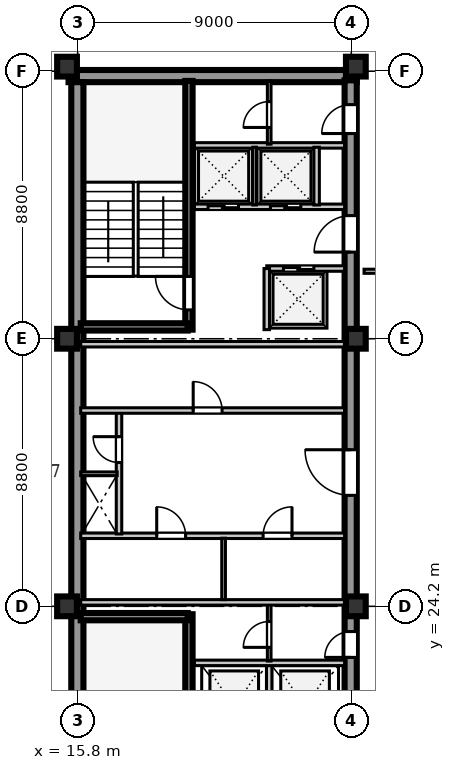
"""IFC4 building model, lengths in metres.
Left out: names, types, materials, properties, quantities, classifications, styles, units other than length and angle.
Written with IfcOpenShell. Run it as: python <this file> out.ifc"""

import sys

from ifc_helpers import new_model, si_unit, direction, frame, frame_2d, origin, origin_2d, place, context, subcontext, project, spatial, rectangle, extrude, element, fill, save


model = new_model("IFC4")
c1 = context("Model", 3, precision=1e-05, world=origin(), true_north=direction((0.0, 1.0)))
c2 = subcontext(c1, "Body", "Model", "MODEL_VIEW")
j1 = project(units=[si_unit("LENGTHUNIT", "METRE"), si_unit("PLANEANGLEUNIT", "RADIAN")], contexts=[c1])
p1 = place(None, origin())
s1 = spatial("IfcSite", under=j1, at=p1, CompositionType="ELEMENT")
p2 = place(p1, origin())
s2 = spatial("IfcBuilding", under=s1, at=p2, CompositionType="ELEMENT")
p3 = place(p2, frame((0.0, 0.0, 296.0)))
s3 = spatial("IfcBuildingStorey", under=s2, at=p3, CompositionType="ELEMENT", Elevation=296.0)
p4 = place(p3, frame((15.5, 41.64, 0.0), z_axis=(0.0, 0.0, 1.0), x_axis=(1.0, 0.0, 0.0)))
e1 = element("IfcWall", 1, at=p4, inside=s3, PredefinedType="SHEAR", context=c2, shape_type="SweptSolid", body=[
    extrude(rectangle(XDim=9.48, YDim=0.4, at=frame_2d((4.74, 0.0))), origin(), (0.0, 0.0, 1.0), 3.66),
])
p5 = place(p3, frame((15.79, 15.81, 0.0), z_axis=(0.0, 0.0, 1.0), x_axis=(0.0, 1.0, 0.0)))
e2 = element("IfcWall", 2, at=p5, inside=s3, PredefinedType="SHEAR", context=c2, shape_type="SweptSolid", body=[
    extrude(rectangle(XDim=25.63, YDim=0.4, at=frame_2d((12.815, 0.0))), origin(), (0.0, 0.0, 1.0), 3.66),
])
p6 = place(p3, frame((24.78, 15.74, 0.0), z_axis=(0.0, 0.0, 1.0), x_axis=(0.0, 1.0, 0.0)))
e3 = element("IfcWall", 3, at=p6, inside=s3, PredefinedType="SHEAR", context=c2, shape_type="SweptSolid", body=[
    extrude(rectangle(XDim=25.76, YDim=0.4, at=frame_2d((12.88, 0.0))), origin(), (0.0, 0.0, 1.0), 3.66),
])
p7 = place(p6, frame((1.61, 0.0, 0.0)))
e4 = element("IfcOpeningElement", 4, at=p7, cuts=e3, PredefinedType="OPENING", context=c2, shape_type="SweptSolid", body=[
    extrude(rectangle(XDim=1.2, YDim=2.1, at=frame_2d((0.6, 1.05))), frame((0.0, 0.21, 0.0), z_axis=(0.0, -1.0, 0.0), x_axis=(1.0, 0.0, 0.0)), (0.0, 0.0, 1.0), 0.42),
])
p8 = place(p6, frame((6.78, 0.0, 0.0)))
e5 = element("IfcOpeningElement", 5, at=p8, cuts=e3, PredefinedType="OPENING", context=c2, shape_type="SweptSolid", body=[
    extrude(rectangle(XDim=0.85, YDim=2.06, at=frame_2d((0.425, 1.03))), frame((0.0, 0.21, 0.0), z_axis=(0.0, -1.0, 0.0), x_axis=(1.0, 0.0, 0.0)), (0.0, 0.0, 1.0), 0.42),
])
p9 = place(p6, frame((12.11, 0.0, 0.0)))
e6 = element("IfcOpeningElement", 6, at=p9, cuts=e3, PredefinedType="OPENING", context=c2, shape_type="SweptSolid", body=[
    extrude(rectangle(XDim=1.5, YDim=2.12, at=frame_2d((0.75, 1.06))), frame((0.0, 0.21, 0.0), z_axis=(0.0, -1.0, 0.0), x_axis=(1.0, 0.0, 0.0)), (0.0, 0.0, 1.0), 0.42),
])
p10 = place(p6, frame((20.11, 0.0, 0.0)))
e7 = element("IfcOpeningElement", 7, at=p10, cuts=e3, PredefinedType="OPENING", context=c2, shape_type="SweptSolid", body=[
    extrude(rectangle(XDim=1.2, YDim=2.12, at=frame_2d((0.6, 1.06))), frame((0.0, 0.21, 0.0), z_axis=(0.0, -1.0, 0.0), x_axis=(1.0, 0.0, 0.0)), (0.0, 0.0, 1.0), 0.42),
])
p11 = place(p6, frame((24.01, 0.0, 0.0)))
e8 = element("IfcOpeningElement", 8, at=p11, cuts=e3, PredefinedType="OPENING", context=c2, shape_type="SweptSolid", body=[
    extrude(rectangle(XDim=0.95, YDim=2.1, at=frame_2d((0.475, 1.05))), frame((0.0, 0.21, 0.0), z_axis=(0.0, -1.0, 0.0), x_axis=(1.0, 0.0, 0.0)), (0.0, 0.0, 1.0), 0.42),
])
for number, where, z_axis, x_axis in (
    (9, (15.45, 24.2, 0.0), (0.0, 0.0, 1.0), (1.0, 0.0, 0.0)),
    (10, (15.45, 33.0, 0.0), (0.0, 0.0, 1.0), (1.0, 0.0, 0.0)),
    (11, (15.45, 41.95, 0.0), (0.0, 0.0, 1.0), (1.0, 0.0, 0.0)),
    (12, (24.95, 24.2, 0.0), (0.0, 0.0, 1.0), (1.0, 0.0, 0.0)),
    (13, (24.95, 33.0, 0.0), (0.0, 0.0, 1.0), (1.0, 0.0, 0.0)),
    (14, (24.95, 41.95, 0.0), (0.0, 0.0, 1.0), (1.0, 0.0, 0.0)),
):
    element("IfcColumn", number, at=place(p3, frame(where, z_axis=z_axis, x_axis=x_axis)), inside=s3, PredefinedType="COLUMN", context=c2, shape_type="SweptSolid", body=[
        extrude(rectangle(XDim=0.65, YDim=0.65, at=origin_2d()), origin(), (0.0, 0.0, 1.0), 3.66),
    ])
p12 = place(p3, frame((19.46, 15.74, 0.0), z_axis=(0.0, 0.0, 1.0), x_axis=(0.0, 1.0, 0.0)))
e15 = element("IfcWall", 15, at=p12, inside=s3, PredefinedType="SHEAR", context=c2, shape_type="SweptSolid", body=[
    extrude(rectangle(XDim=8.2, YDim=0.24, at=frame_2d((4.1, 0.0))), origin(), (0.0, 0.0, 1.0), 3.9),
])
p13 = place(p12, frame((0.45, 0.0, 0.0)))
e16 = element("IfcOpeningElement", 16, at=p13, cuts=e15, PredefinedType="OPENING", context=c2, shape_type="SweptSolid", body=[
    extrude(rectangle(XDim=1.1, YDim=2.1, at=frame_2d((0.55, 1.05))), frame((0.0, 0.13, 0.0), z_axis=(0.0, -1.0, 0.0), x_axis=(1.0, 0.0, 0.0)), (0.0, 0.0, 1.0), 0.26),
])
p14 = place(p3, frame((15.9, 23.86, 0.0), z_axis=(0.0, 0.0, 1.0), x_axis=(1.0, 0.0, 0.0)))
e17 = element("IfcWall", 17, at=p14, inside=s3, PredefinedType="SHEAR", context=c2, shape_type="SweptSolid", body=[
    extrude(rectangle(XDim=3.52, YDim=0.24, at=frame_2d((1.76, 0.0))), origin(), (0.0, 0.0, 1.0), 3.9),
])
p15 = place(p3, frame((22.1, 19.51, 0.0), z_axis=(0.0, 0.0, 1.0), x_axis=(0.0, 1.0, 0.0)))
e18 = element("IfcWall", 18, at=p15, inside=s3, PredefinedType="SOLIDWALL", context=c2, shape_type="SweptSolid", body=[
    extrude(rectangle(XDim=2.74, YDim=0.18, at=frame_2d((1.37, 0.0))), origin(), (0.0, 0.0, 1.0), 3.66),
])
p16 = place(p3, frame((19.64, 22.34, 0.0), z_axis=(0.0, 0.0, 1.0), x_axis=(1.0, 0.0, 0.0)))
e19 = element("IfcWall", 19, at=p16, inside=s3, PredefinedType="SOLIDWALL", context=c2, shape_type="SweptSolid", body=[
    extrude(rectangle(XDim=4.94, YDim=0.18, at=frame_2d((2.47, 0.0))), origin(), (0.0, 0.0, 1.0), 3.66),
])
p17 = place(p3, frame((22.1, 22.4, 0.0), z_axis=(0.0, 0.0, 1.0), x_axis=(0.0, 1.0, 0.0)))
e20 = element("IfcWall", 20, at=p17, inside=s3, PredefinedType="PARTITIONING", context=c2, shape_type="SweptSolid", body=[
    extrude(rectangle(XDim=1.88, YDim=0.12, at=frame_2d((0.94, 0.0))), origin(), (0.0, 0.0, 1.0), 3.66),
])
p18 = place(p17, frame((0.45, 0.0, 0.0)))
e21 = element("IfcOpeningElement", 21, at=p18, cuts=e20, PredefinedType="OPENING", context=c2, shape_type="SweptSolid", body=[
    extrude(rectangle(XDim=0.85, YDim=2.06, at=frame_2d((0.425, 1.03))), frame((0.0, 0.07, 0.0), z_axis=(0.0, -1.0, 0.0), x_axis=(1.0, 0.0, 0.0)), (0.0, 0.0, 1.0), 0.14),
])
p19 = place(p3, frame((15.9, 26.52, 0.0), z_axis=(0.0, 0.0, 1.0), x_axis=(1.0, 0.0, 0.0)))
e22 = element("IfcWall", 22, at=p19, inside=s3, PredefinedType="SOLIDWALL", context=c2, shape_type="SweptSolid", body=[
    extrude(rectangle(XDim=8.68, YDim=0.18, at=frame_2d((4.34, 0.0))), origin(), (0.0, 0.0, 1.0), 3.66),
])
p20 = place(p19, frame((2.5, 0.0, 0.0)))
e23 = element("IfcOpeningElement", 23, at=p20, cuts=e22, PredefinedType="OPENING", context=c2, shape_type="SweptSolid", body=[
    extrude(rectangle(XDim=0.95, YDim=2.1, at=frame_2d((0.475, 1.05))), frame((0.0, 0.1, 0.0), z_axis=(0.0, -1.0, 0.0), x_axis=(1.0, 0.0, 0.0)), (0.0, 0.0, 1.0), 0.2),
])
p21 = place(p19, frame((6.0, 0.0, 0.0)))
e24 = element("IfcOpeningElement", 24, at=p21, cuts=e22, PredefinedType="OPENING", context=c2, shape_type="SweptSolid", body=[
    extrude(rectangle(XDim=0.95, YDim=2.1, at=frame_2d((0.475, 1.05))), frame((0.0, 0.1, 0.0), z_axis=(0.0, -1.0, 0.0), x_axis=(1.0, 0.0, 0.0)), (0.0, 0.0, 1.0), 0.2),
])
p22 = place(p3, frame((15.9, 24.33, 0.0), z_axis=(0.0, 0.0, 1.0), x_axis=(1.0, 0.0, 0.0)))
e25 = element("IfcWall", 25, at=p22, inside=s3, PredefinedType="SOLIDWALL", context=c2, shape_type="SweptSolid", body=[
    extrude(rectangle(XDim=8.68, YDim=0.18, at=frame_2d((4.34, 0.0))), origin(), (0.0, 0.0, 1.0), 3.06),
])
p23 = place(p3, frame((20.6, 24.42, 0.0), z_axis=(0.0, 0.0, 1.0), x_axis=(0.0, 1.0, 0.0)))
e26 = element("IfcWall", 26, at=p23, inside=s3, PredefinedType="PARTITIONING", context=c2, shape_type="SweptSolid", body=[
    extrude(rectangle(XDim=2.02, YDim=0.12, at=frame_2d((1.01, 0.0))), origin(), (0.0, 0.0, 1.0), 3.66),
])
p24 = place(p3, frame((17.16, 26.58, 0.0), z_axis=(0.0, 0.0, 1.0), x_axis=(0.0, 1.0, 0.0)))
e27 = element("IfcWall", 27, at=p24, inside=s3, PredefinedType="SOLIDWALL", context=c2, shape_type="SweptSolid", body=[
    extrude(rectangle(XDim=4.02, YDim=0.18, at=frame_2d((2.01, 0.0))), origin(), (0.0, 0.0, 1.0), 3.66),
])
p25 = place(p24, frame((2.35, 0.0, 0.0)))
e28 = element("IfcOpeningElement", 28, at=p25, cuts=e27, PredefinedType="OPENING", context=c2, shape_type="SweptSolid", body=[
    extrude(rectangle(XDim=0.85, YDim=2.06, at=frame_2d((0.425, 1.03))), frame((0.0, 0.1, 0.0), z_axis=(0.0, -1.0, 0.0), x_axis=(1.0, 0.0, 0.0)), (0.0, 0.0, 1.0), 0.2),
])
p26 = place(p3, frame((15.9, 28.56, 0.0), z_axis=(0.0, 0.0, 1.0), x_axis=(1.0, 0.0, 0.0)))
e29 = element("IfcWall", 29, at=p26, inside=s3, PredefinedType="PARTITIONING", context=c2, shape_type="SweptSolid", body=[
    extrude(rectangle(XDim=1.2, YDim=0.12, at=frame_2d((0.6, 0.0))), origin(), (0.0, 0.0, 1.0), 3.66),
])
p27 = place(p3, frame((15.9, 30.64, 0.0), z_axis=(0.0, 0.0, 1.0), x_axis=(1.0, 0.0, 0.0)))
e30 = element("IfcWall", 30, at=p27, inside=s3, PredefinedType="SOLIDWALL", context=c2, shape_type="SweptSolid", body=[
    extrude(rectangle(XDim=8.68, YDim=0.18, at=frame_2d((4.34, 0.0))), origin(), (0.0, 0.0, 1.0), 3.66),
])
p28 = place(p27, frame((3.7, 0.0, 0.0)))
e31 = element("IfcOpeningElement", 31, at=p28, cuts=e30, PredefinedType="OPENING", context=c2, shape_type="SweptSolid", body=[
    extrude(rectangle(XDim=0.95, YDim=2.1, at=frame_2d((0.475, 1.05))), frame((0.0, 0.1, 0.0), z_axis=(0.0, -1.0, 0.0), x_axis=(1.0, 0.0, 0.0)), (0.0, 0.0, 1.0), 0.2),
])
p29 = place(p3, frame((15.9, 32.82, 0.0), z_axis=(0.0, 0.0, 1.0), x_axis=(1.0, 0.0, 0.0)))
e32 = element("IfcWall", 32, at=p29, inside=s3, PredefinedType="SOLIDWALL", context=c2, shape_type="SweptSolid", body=[
    extrude(rectangle(XDim=8.68, YDim=0.18, at=frame_2d((4.34, 0.0))), origin(), (0.0, 0.0, 1.0), 3.06),
])
p30 = place(p3, frame((19.46, 33.3, 0.0), z_axis=(0.0, 0.0, 1.0), x_axis=(0.0, 1.0, 0.0)))
e33 = element("IfcWall", 33, at=p30, inside=s3, PredefinedType="SHEAR", context=c2, shape_type="SweptSolid", body=[
    extrude(rectangle(XDim=8.18, YDim=0.24, at=frame_2d((4.09, 0.0))), origin(), (0.0, 0.0, 1.0), 3.9),
])
p31 = place(p30, frame((0.65, 0.0, 0.0)))
e34 = element("IfcOpeningElement", 34, at=p31, cuts=e33, PredefinedType="OPENING", context=c2, shape_type="SweptSolid", body=[
    extrude(rectangle(XDim=1.1, YDim=2.1, at=frame_2d((0.55, 1.05))), frame((0.0, 0.13, 0.0), z_axis=(0.0, -1.0, 0.0), x_axis=(1.0, 0.0, 0.0)), (0.0, 0.0, 1.0), 0.26),
])
p32 = place(p3, frame((15.9, 33.39, 0.0), z_axis=(0.0, 0.0, 1.0), x_axis=(1.0, 0.0, 0.0)))
e35 = element("IfcWall", 35, at=p32, inside=s3, PredefinedType="SHEAR", context=c2, shape_type="SweptSolid", body=[
    extrude(rectangle(XDim=3.52, YDim=0.24, at=frame_2d((1.76, 0.0))), origin(), (0.0, 0.0, 1.0), 3.9),
])
p33 = place(p3, frame((22.02, 35.31, 0.0), z_axis=(0.0, 0.0, 1.0), x_axis=(1.0, 0.0, 0.0)))
e36 = element("IfcWall", 36, at=p33, inside=s3, PredefinedType="SOLIDWALL", context=c2, shape_type="SweptSolid", body=[
    extrude(rectangle(XDim=2.56, YDim=0.18, at=frame_2d((1.28, 0.0))), origin(), (0.0, 0.0, 1.0), 3.66),
])
p34 = place(p33, frame((0.55, 0.0, 0.0)))
e37 = element("IfcOpeningElement", 37, at=p34, cuts=e36, PredefinedType="OPENING", context=c2, shape_type="SweptSolid", body=[
    extrude(rectangle(XDim=1.0, YDim=2.1, at=frame_2d((0.5, 1.05))), frame((0.0, 0.1, 0.0), z_axis=(0.0, -1.0, 0.0), x_axis=(1.0, 0.0, 0.0)), (0.0, 0.0, 1.0), 0.2),
])
p35 = place(p3, frame((22.02, 33.3, 0.0), z_axis=(0.0, 0.0, 1.0), x_axis=(0.0, 1.0, 0.0)))
e38 = element("IfcWall", 38, at=p35, inside=s3, PredefinedType="SOLIDWALL", context=c2, shape_type="SweptSolid", body=[
    extrude(rectangle(XDim=2.01, YDim=0.18, at=frame_2d((1.005, 0.0))), origin(), (0.0, 0.0, 1.0), 3.66),
])
p36 = place(p3, frame((19.64, 37.34, 0.0), z_axis=(0.0, 0.0, 1.0), x_axis=(1.0, 0.0, 0.0)))
e39 = element("IfcWall", 39, at=p36, inside=s3, PredefinedType="SOLIDWALL", context=c2, shape_type="SweptSolid", body=[
    extrude(rectangle(XDim=4.94, YDim=0.18, at=frame_2d((2.47, 0.0))), origin(), (0.0, 0.0, 1.0), 3.66),
])
p37 = place(p36, frame((0.45, 0.0, 0.0)))
e40 = element("IfcOpeningElement", 40, at=p37, cuts=e39, PredefinedType="OPENING", context=c2, shape_type="SweptSolid", body=[
    extrude(rectangle(XDim=1.0, YDim=2.1, at=frame_2d((0.5, 1.05))), frame((0.0, 0.1, 0.0), z_axis=(0.0, -1.0, 0.0), x_axis=(1.0, 0.0, 0.0)), (0.0, 0.0, 1.0), 0.2),
])
p38 = place(p36, frame((2.5, 0.0, 0.0)))
e41 = element("IfcOpeningElement", 41, at=p38, cuts=e39, PredefinedType="OPENING", context=c2, shape_type="SweptSolid", body=[
    extrude(rectangle(XDim=1.0, YDim=2.1, at=frame_2d((0.5, 1.05))), frame((0.0, 0.1, 0.0), z_axis=(0.0, -1.0, 0.0), x_axis=(1.0, 0.0, 0.0)), (0.0, 0.0, 1.0), 0.2),
])
p39 = place(p3, frame((19.64, 39.36, 0.0), z_axis=(0.0, 0.0, 1.0), x_axis=(1.0, 0.0, 0.0)))
e42 = element("IfcWall", 42, at=p39, inside=s3, PredefinedType="SOLIDWALL", context=c2, shape_type="SweptSolid", body=[
    extrude(rectangle(XDim=4.94, YDim=0.18, at=frame_2d((2.47, 0.0))), origin(), (0.0, 0.0, 1.0), 3.66),
])
p40 = place(p3, frame((21.62, 37.4, 0.0), z_axis=(0.0, 0.0, 1.0), x_axis=(0.0, 1.0, 0.0)))
e43 = element("IfcWall", 43, at=p40, inside=s3, PredefinedType="PARTITIONING", context=c2, shape_type="SweptSolid", body=[
    extrude(rectangle(XDim=1.9, YDim=0.12, at=frame_2d((0.95, 0.0))), origin(), (0.0, 0.0, 1.0), 3.66),
])
p41 = place(p3, frame((23.66, 37.4, 0.0), z_axis=(0.0, 0.0, 1.0), x_axis=(0.0, 1.0, 0.0)))
e44 = element("IfcWall", 44, at=p41, inside=s3, PredefinedType="SOLIDWALL", context=c2, shape_type="SweptSolid", body=[
    extrude(rectangle(XDim=1.9, YDim=0.18, at=frame_2d((0.95, 0.0))), origin(), (0.0, 0.0, 1.0), 3.66),
])
p42 = place(p3, frame((22.1, 39.4, 0.0), z_axis=(0.0, 0.0, 1.0), x_axis=(0.0, 1.0, 0.0)))
e45 = element("IfcWall", 45, at=p42, inside=s3, PredefinedType="PARTITIONING", context=c2, shape_type="SweptSolid", body=[
    extrude(rectangle(XDim=2.08, YDim=0.12, at=frame_2d((1.04, 0.0))), origin(), (0.0, 0.0, 1.0), 3.66),
])
p43 = place(p42, frame((0.55, 0.0, 0.0)))
e46 = element("IfcOpeningElement", 46, at=p43, cuts=e45, PredefinedType="OPENING", context=c2, shape_type="SweptSolid", body=[
    extrude(rectangle(XDim=0.85, YDim=2.06, at=frame_2d((0.425, 1.03))), frame((0.0, 0.07, 0.0), z_axis=(0.0, -1.0, 0.0), x_axis=(1.0, 0.0, 0.0)), (0.0, 0.0, 1.0), 0.14),
])
p44 = place(p3, frame((25.22, 35.22, 0.0), z_axis=(0.0, 0.0, 1.0), x_axis=(1.0, 0.0, 0.0)))
e47 = element("IfcWall", 47, at=p44, inside=s3, PredefinedType="PARTITIONING", context=c2, shape_type="SweptSolid", body=[
    extrude(rectangle(XDim=9.5, YDim=0.135, at=frame_2d((4.75, 0.0))), origin(), (0.0, 0.0, 1.0), 3.66),
])
p45 = place(p44, frame((1.2, 0.0, 0.0)))
e48 = element("IfcOpeningElement", 48, at=p45, cuts=e47, PredefinedType="OPENING", context=c2, shape_type="SweptSolid", body=[
    extrude(rectangle(XDim=1.0, YDim=2.08, at=frame_2d((0.5, 1.04))), frame((0.0, 0.078, 0.0), z_axis=(0.0, -1.0, 0.0), x_axis=(1.0, 0.0, 0.0)), (0.0, 0.0, 1.0), 0.155),
])
p46 = place(p44, frame((6.2, 0.0, 0.0)))
e49 = element("IfcOpeningElement", 49, at=p46, cuts=e47, PredefinedType="OPENING", context=c2, shape_type="SweptSolid", body=[
    extrude(rectangle(XDim=0.9, YDim=2.08, at=frame_2d((0.45, 1.04))), frame((0.0, 0.078, 0.0), z_axis=(0.0, -1.0, 0.0), x_axis=(1.0, 0.0, 0.0)), (0.0, 0.0, 1.0), 0.155),
])
p47 = place(p18, origin())
e50 = element("IfcDoor", 50, at=p47, inside=s3, OperationType="SINGLE_SWING_LEFT", PredefinedType="DOOR", context=c2, shape_type="SweptSolid", body=[
    extrude(rectangle(XDim=0.85, YDim=2.06, at=frame_2d((0.425, 1.03))), frame((0.0, 0.025, 0.0), z_axis=(0.0, -1.0, 0.0), x_axis=(1.0, 0.0, 0.0)), (0.0, 0.0, 1.0), 0.05),
])
fill(e21, e50)
p48 = place(p8, frame((0.85, 0.0, 0.0), z_axis=(0.0, 0.0, 1.0), x_axis=(-1.0, 0.0, 0.0)))
e51 = element("IfcDoor", 51, at=p48, inside=s3, OperationType="SINGLE_SWING_RIGHT", PredefinedType="DOOR", context=c2, shape_type="SweptSolid", body=[
    extrude(rectangle(XDim=0.85, YDim=2.06, at=frame_2d((0.425, 1.03))), frame((0.0, 0.025, 0.0), z_axis=(0.0, -1.0, 0.0), x_axis=(1.0, 0.0, 0.0)), (0.0, 0.0, 1.0), 0.05),
])
fill(e5, e51)
p49 = place(p20, origin())
e52 = element("IfcDoor", 52, at=p49, inside=s3, OperationType="SINGLE_SWING_LEFT", PredefinedType="DOOR", context=c2, shape_type="SweptSolid", body=[
    extrude(rectangle(XDim=0.95, YDim=2.1, at=frame_2d((0.475, 1.05))), frame((0.0, 0.025, 0.0), z_axis=(0.0, -1.0, 0.0), x_axis=(1.0, 0.0, 0.0)), (0.0, 0.0, 1.0), 0.05),
])
fill(e23, e52)
p50 = place(p21, origin())
e53 = element("IfcDoor", 53, at=p50, inside=s3, OperationType="SINGLE_SWING_RIGHT", PredefinedType="DOOR", context=c2, shape_type="SweptSolid", body=[
    extrude(rectangle(XDim=0.95, YDim=2.1, at=frame_2d((0.475, 1.05))), frame((0.0, 0.025, 0.0), z_axis=(0.0, -1.0, 0.0), x_axis=(1.0, 0.0, 0.0)), (0.0, 0.0, 1.0), 0.05),
])
fill(e24, e53)
p51 = place(p25, origin())
e54 = element("IfcDoor", 54, at=p51, inside=s3, OperationType="SINGLE_SWING_RIGHT", PredefinedType="DOOR", context=c2, shape_type="SweptSolid", body=[
    extrude(rectangle(XDim=0.85, YDim=2.06, at=frame_2d((0.425, 1.03))), frame((0.0, 0.025, 0.0), z_axis=(0.0, -1.0, 0.0), x_axis=(1.0, 0.0, 0.0)), (0.0, 0.0, 1.0), 0.05),
])
fill(e28, e54)
p52 = place(p9, frame((1.5, 0.0, 0.0), z_axis=(0.0, 0.0, 1.0), x_axis=(-1.0, 0.0, 0.0)))
e55 = element("IfcDoor", 55, at=p52, inside=s3, OperationType="SINGLE_SWING_LEFT", PredefinedType="DOOR", context=c2, shape_type="SweptSolid", body=[
    extrude(rectangle(XDim=1.5, YDim=2.12, at=frame_2d((0.75, 1.06))), frame((0.0, 0.025, 0.0), z_axis=(0.0, -1.0, 0.0), x_axis=(1.0, 0.0, 0.0)), (0.0, 0.0, 1.0), 0.05),
])
fill(e6, e55)
p53 = place(p28, frame((0.95, 0.0, 0.0), z_axis=(0.0, 0.0, 1.0), x_axis=(-1.0, 0.0, 0.0)))
e56 = element("IfcDoor", 56, at=p53, inside=s3, OperationType="SINGLE_SWING_RIGHT", PredefinedType="DOOR", context=c2, shape_type="SweptSolid", body=[
    extrude(rectangle(XDim=0.95, YDim=2.1, at=frame_2d((0.475, 1.05))), frame((0.0, 0.025, 0.0), z_axis=(0.0, -1.0, 0.0), x_axis=(1.0, 0.0, 0.0)), (0.0, 0.0, 1.0), 0.05),
])
fill(e31, e56)
p54 = place(p31, origin())
e57 = element("IfcDoor", 57, at=p54, inside=s3, OperationType="SINGLE_SWING_RIGHT", PredefinedType="DOOR", context=c2, shape_type="SweptSolid", body=[
    extrude(rectangle(XDim=1.1, YDim=2.1, at=frame_2d((0.55, 1.05))), frame((0.0, 0.025, 0.0), z_axis=(0.0, -1.0, 0.0), x_axis=(1.0, 0.0, 0.0)), (0.0, 0.0, 1.0), 0.05),
])
fill(e34, e57)
p55 = place(p10, frame((1.2, 0.0, 0.0), z_axis=(0.0, 0.0, 1.0), x_axis=(-1.0, 0.0, 0.0)))
e58 = element("IfcDoor", 58, at=p55, inside=s3, OperationType="SINGLE_SWING_RIGHT", PredefinedType="DOOR", context=c2, shape_type="SweptSolid", body=[
    extrude(rectangle(XDim=1.2, YDim=2.12, at=frame_2d((0.6, 1.06))), frame((0.0, 0.025, 0.0), z_axis=(0.0, -1.0, 0.0), x_axis=(1.0, 0.0, 0.0)), (0.0, 0.0, 1.0), 0.05),
])
fill(e7, e58)
p56 = place(p37, frame((1.0, 0.0, 0.0), z_axis=(0.0, 0.0, 1.0), x_axis=(-1.0, 0.0, 0.0)))
e59 = element("IfcDoor", 59, at=p56, inside=s3, OperationType="DOUBLE_DOOR_SLIDING", PredefinedType="DOOR", context=c2, shape_type="SweptSolid", body=[
    extrude(rectangle(XDim=1.0, YDim=2.1, at=frame_2d((0.5, 1.05))), frame((0.0, 0.025, 0.0), z_axis=(0.0, -1.0, 0.0), x_axis=(1.0, 0.0, 0.0)), (0.0, 0.0, 1.0), 0.05),
])
fill(e40, e59)
p57 = place(p38, frame((1.0, 0.0, 0.0), z_axis=(0.0, 0.0, 1.0), x_axis=(-1.0, 0.0, 0.0)))
e60 = element("IfcDoor", 60, at=p57, inside=s3, OperationType="DOUBLE_DOOR_SLIDING", PredefinedType="DOOR", context=c2, shape_type="SweptSolid", body=[
    extrude(rectangle(XDim=1.0, YDim=2.1, at=frame_2d((0.5, 1.05))), frame((0.0, 0.025, 0.0), z_axis=(0.0, -1.0, 0.0), x_axis=(1.0, 0.0, 0.0)), (0.0, 0.0, 1.0), 0.05),
])
fill(e41, e60)
p58 = place(p34, origin())
e61 = element("IfcDoor", 61, at=p58, inside=s3, OperationType="DOUBLE_DOOR_SLIDING", PredefinedType="DOOR", context=c2, shape_type="SweptSolid", body=[
    extrude(rectangle(XDim=1.0, YDim=2.1, at=frame_2d((0.5, 1.05))), frame((0.0, 0.025, 0.0), z_axis=(0.0, -1.0, 0.0), x_axis=(1.0, 0.0, 0.0)), (0.0, 0.0, 1.0), 0.05),
])
fill(e37, e61)
p59 = place(p43, origin())
e62 = element("IfcDoor", 62, at=p59, inside=s3, OperationType="SINGLE_SWING_LEFT", PredefinedType="DOOR", context=c2, shape_type="SweptSolid", body=[
    extrude(rectangle(XDim=0.85, YDim=2.06, at=frame_2d((0.425, 1.03))), frame((0.0, 0.025, 0.0), z_axis=(0.0, -1.0, 0.0), x_axis=(1.0, 0.0, 0.0)), (0.0, 0.0, 1.0), 0.05),
])
fill(e46, e62)
p60 = place(p11, frame((0.95, 0.0, 0.0), z_axis=(0.0, 0.0, 1.0), x_axis=(-1.0, 0.0, 0.0)))
e63 = element("IfcDoor", 63, at=p60, inside=s3, OperationType="SINGLE_SWING_RIGHT", PredefinedType="DOOR", context=c2, shape_type="SweptSolid", body=[
    extrude(rectangle(XDim=0.95, YDim=2.1, at=frame_2d((0.475, 1.05))), frame((0.0, 0.025, 0.0), z_axis=(0.0, -1.0, 0.0), x_axis=(1.0, 0.0, 0.0)), (0.0, 0.0, 1.0), 0.05),
])
fill(e8, e63)
save(model, sys.argv[1])
